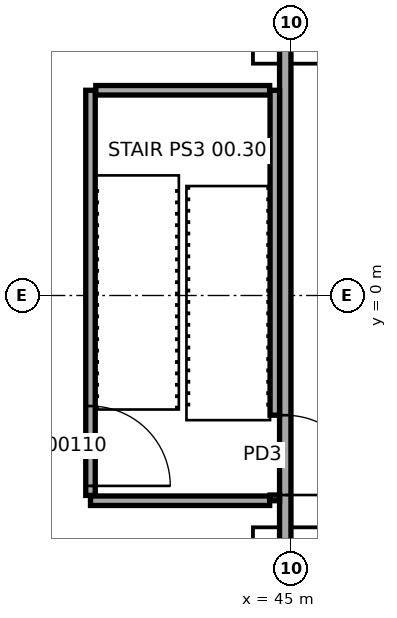
"""IFC4 building model, lengths in metres.
Left out: names, types, materials, properties, quantities, classifications, styles, units other than length and angle.
Written with IfcOpenShell. Run it as: python <this file> out.ifc"""

import sys

from ifc_helpers import new_model, si_unit, direction, frame, frame_2d, origin, place, context, subcontext, project, spatial, rectangle, extrude, element, fill, save


model = new_model("IFC4")
c1 = context("Model", 3, precision=1e-05, world=origin(), true_north=direction((0.0, 1.0)))
c2 = subcontext(c1, "Body", "Model", "MODEL_VIEW")
j1 = project(units=[si_unit("LENGTHUNIT", "METRE"), si_unit("PLANEANGLEUNIT", "RADIAN")], contexts=[c1])
p1 = place(None, origin())
s1 = spatial("IfcSite", under=j1, at=p1, CompositionType="ELEMENT")
p2 = place(p1, origin())
s2 = spatial("IfcBuilding", under=s1, at=p2, CompositionType="ELEMENT")
p3 = place(p2, origin())
s3 = spatial("IfcBuildingStorey", under=s2, at=p3, CompositionType="ELEMENT", Elevation=0.0)
p4 = place(p3, frame((44.85, -8.45, 0.0), z_axis=(0.0, 0.0, 1.0), x_axis=(0.0, 1.0, 0.0)))
e1 = element("IfcWall", 1, at=p4, inside=s3, PredefinedType="STANDARD", context=c2, shape_type="SweptSolid", body=[
    extrude(rectangle(XDim=16.9, YDim=0.3, at=frame_2d((8.45, 0.0))), origin(), (0.0, 0.0, 1.0), 6.0),
])
p5 = place(p4, frame((3.2, 0.0, 0.0)))
e2 = element("IfcOpeningElement", 2, at=p5, cuts=e1, PredefinedType="OPENING", context=c2, shape_type="SweptSolid", body=[
    extrude(rectangle(XDim=2.1, YDim=2.4, at=frame_2d((1.05, 1.2))), frame((0.0, 0.16, 0.0), z_axis=(0.0, -1.0, 0.0), x_axis=(1.0, 0.0, 0.0)), (0.0, 0.0, 1.0), 0.32),
])
p6 = place(p3, frame((44.44, -5.4, 0.0), z_axis=(0.0, 0.0, 1.0), x_axis=(-1.0, 0.0, 0.0)))
e3 = element("IfcWall", 3, at=p6, inside=s3, PredefinedType="SOLIDWALL", context=c2, shape_type="SweptSolid", body=[
    extrude(rectangle(XDim=4.715, YDim=0.25, at=frame_2d((2.357, 0.0))), origin(), (0.0, 0.0, 1.0), 7.2),
])
p7 = place(p3, frame((39.725, -5.26, 0.0), z_axis=(0.0, 0.0, 1.0), x_axis=(0.0, 1.0, 0.0)))
e4 = element("IfcWall", 4, at=p7, inside=s3, PredefinedType="SOLIDWALL", context=c2, shape_type="SweptSolid", body=[
    extrude(rectangle(XDim=10.66, YDim=0.25, at=frame_2d((5.33, 0.0))), origin(), (0.0, 0.0, 1.0), 7.2),
])
p8 = place(p7, frame((0.25, 0.0, 0.0)))
e5 = element("IfcOpeningElement", 5, at=p8, cuts=e4, PredefinedType="OPENING", context=c2, shape_type="SweptSolid", body=[
    extrude(rectangle(XDim=2.1, YDim=2.4, at=frame_2d((1.05, 1.2))), frame((0.0, 0.135, 0.0), z_axis=(0.0, -1.0, 0.0), x_axis=(1.0, 0.0, 0.0)), (0.0, 0.0, 1.0), 0.27),
])
p9 = place(p3, frame((39.865, 5.4, 0.0), z_axis=(0.0, 0.0, 1.0), x_axis=(1.0, 0.0, 0.0)))
e6 = element("IfcWall", 6, at=p9, inside=s3, PredefinedType="SOLIDWALL", context=c2, shape_type="SweptSolid", body=[
    extrude(rectangle(XDim=4.575, YDim=0.25, at=frame_2d((2.288, 0.0))), origin(), (0.0, 0.0, 1.0), 7.2),
])
p10 = place(p3, frame((44.575, 5.4, 0.0), z_axis=(0.0, 0.0, 1.0), x_axis=(0.0, -1.0, 0.0)))
e7 = element("IfcWall", 7, at=p10, inside=s3, PredefinedType="SOLIDWALL", context=c2, shape_type="SweptSolid", body=[
    extrude(rectangle(XDim=8.55, YDim=0.25, at=frame_2d((4.275, 0.0))), origin(), (0.0, 0.0, 1.0), 7.2),
])
p11 = place(p3, frame((44.575, -5.25, 0.0), z_axis=(0.0, 0.0, 1.0), x_axis=(0.0, -1.0, 0.0)))
e8 = element("IfcWall", 8, at=p11, inside=s3, PredefinedType="SOLIDWALL", context=c2, shape_type="SweptSolid", body=[
    extrude(rectangle(XDim=0.15, YDim=0.25, at=frame_2d((0.075, 0.0))), origin(), (0.0, 0.0, 1.0), 7.2),
])
p12 = place(p8, frame((2.1, 0.0, 0.0), z_axis=(0.0, 0.0, 1.0), x_axis=(-1.0, 0.0, 0.0)))
e9 = element("IfcDoor", 9, at=p12, inside=s3, OperationType="DOUBLE_DOOR_SINGLE_SWING", PredefinedType="DOOR", context=c2, shape_type="SweptSolid", body=[
    extrude(rectangle(XDim=2.1, YDim=2.4, at=frame_2d((1.05, 1.2))), frame((0.0, 0.025, 0.0), z_axis=(0.0, -1.0, 0.0), x_axis=(1.0, 0.0, 0.0)), (0.0, 0.0, 1.0), 0.05),
])
fill(e5, e9)
p13 = place(p5, frame((2.1, 0.0, 0.0), z_axis=(0.0, 0.0, 1.0), x_axis=(-1.0, 0.0, 0.0)))
e10 = element("IfcDoor", 10, at=p13, inside=s3, OperationType="DOUBLE_DOOR_SINGLE_SWING", PredefinedType="DOOR", context=c2, shape_type="SweptSolid", body=[
    extrude(rectangle(XDim=2.1, YDim=2.4, at=frame_2d((1.05, 1.2))), frame((0.0, 0.025, 0.0), z_axis=(0.0, -1.0, 0.0), x_axis=(1.0, 0.0, 0.0)), (0.0, 0.0, 1.0), 0.05),
])
fill(e2, e10)
save(model, sys.argv[1])
